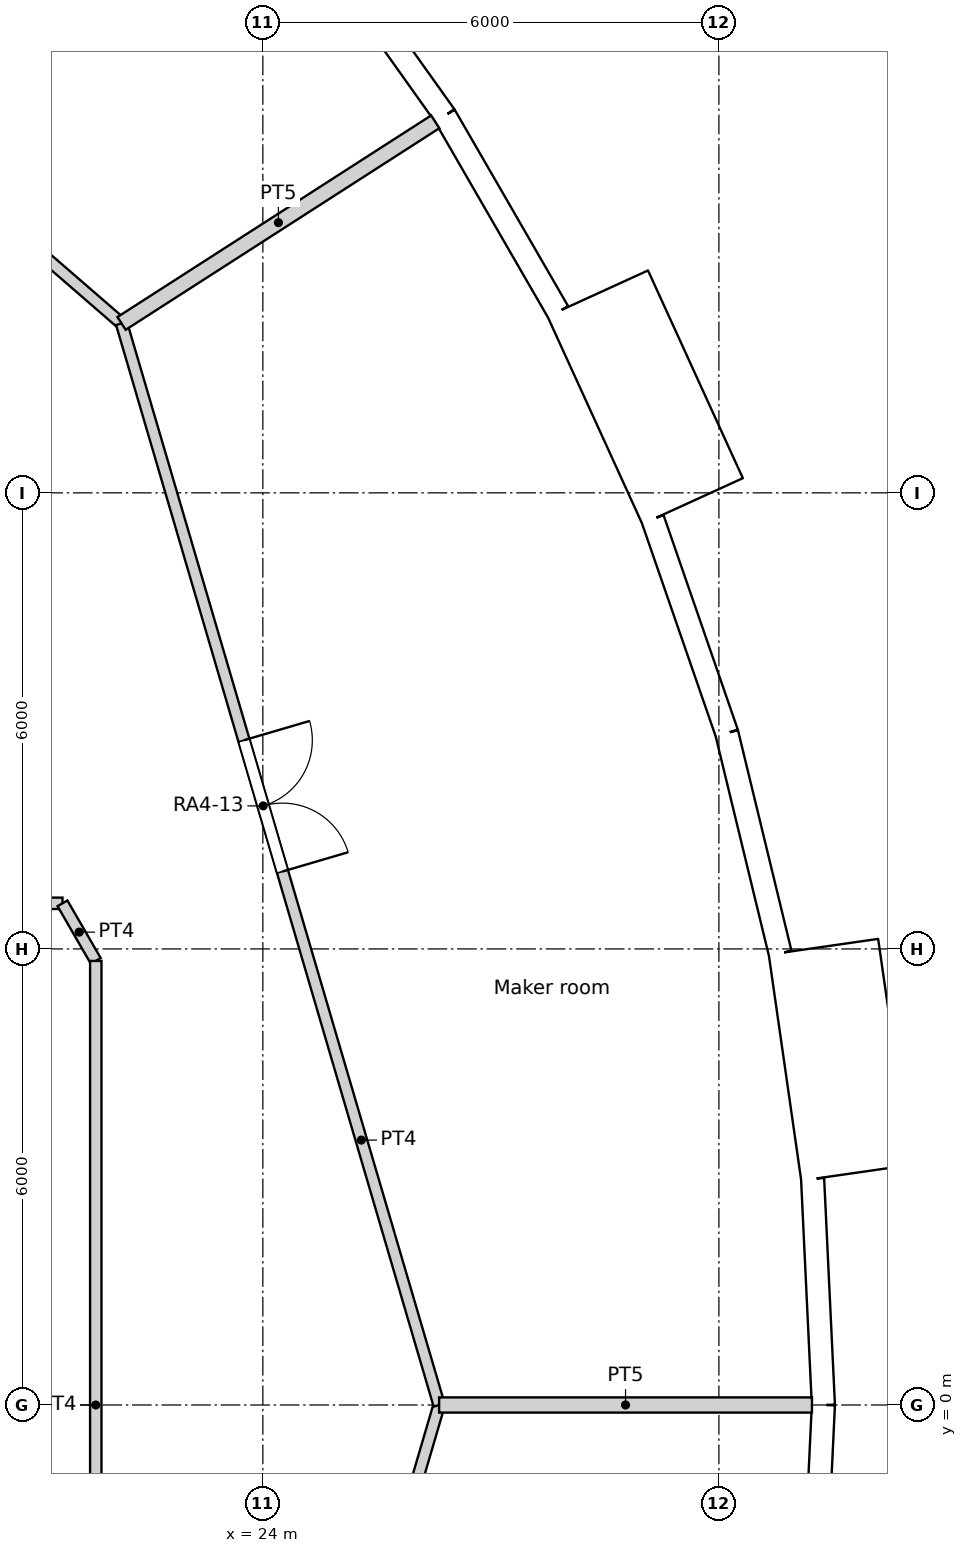
"""IFC4 building model, lengths in metres.
Left out: names, types, materials, properties, quantities, classifications, styles, units other than length and angle.
Written with IfcOpenShell. Run it as: python <this file> out.ifc"""

import sys

from ifc_helpers import new_model, si_unit, direction, frame, frame_2d, origin, origin_2d, place, context, subcontext, project, spatial, rectangle, circle, extrude, element, fill, save


model = new_model("IFC4")
c1 = context("Model", 3, precision=1e-05, world=origin(), true_north=direction((0.0, 1.0)))
c2 = subcontext(c1, "Body", "Model", "MODEL_VIEW")
j1 = project(units=[si_unit("LENGTHUNIT", "METRE"), si_unit("PLANEANGLEUNIT", "RADIAN")], contexts=[c1])
p1 = place(None, origin())
s1 = spatial("IfcSite", under=j1, at=p1, CompositionType="ELEMENT")
p2 = place(p1, origin())
s2 = spatial("IfcBuilding", under=s1, at=p2, CompositionType="ELEMENT")
p3 = place(p2, frame((0.0, 0.0, 60.6)))
s3 = spatial("IfcBuildingStorey", under=s2, at=p3, CompositionType="ELEMENT", Elevation=60.6)
for number, where, z_axis, x_axis in (
    (1, (30.275, 0.0, 0.0), (0.0, 0.0, 1.0), (1.0, 0.0, 0.0)),
    (2, (29.728, 5.729, 0.0), (0.0, 0.0, 1.0), (1.0, 0.0, 0.0)),
    (3, (28.106, 11.252, 0.0), (0.0, 0.0, 1.0), (1.0, 0.0, 0.0)),
    (4, (25.469, 16.368, 0.0), (0.0, 0.0, 1.0), (1.0, 0.0, 0.0)),
):
    element("IfcColumn", number, at=place(p3, frame(where, z_axis=z_axis, x_axis=x_axis)), inside=s3, PredefinedType="COLUMN", context=c2, shape_type="SweptSolid", body=[
        extrude(circle(Radius=0.7, at=origin_2d()), origin(), (0.0, 0.0, 1.0), 3.6),
    ])
for number, where, z_axis, x_axis in (
    (5, (24.548, 0.0, 0.0), (0.0, 0.0, 1.0), (1.0, 0.0, 0.0)),
    (6, (23.886, 5.661, 0.0), (0.0, 0.0, 1.0), (1.0, 0.0, 0.0)),
    (7, (21.937, 11.017, 0.0), (0.0, 0.0, 1.0), (1.0, 0.0, 0.0)),
):
    element("IfcColumn", number, at=place(p3, frame(where, z_axis=z_axis, x_axis=x_axis)), inside=s3, PredefinedType="COLUMN", context=c2, shape_type="SweptSolid", body=[
        extrude(circle(Radius=0.75, at=origin_2d()), origin(), (0.0, 0.0, 1.0), 3.6),
    ])
p4 = place(p3, frame((31.375, 0.0, 0.0), z_axis=(0.0, 0.0, 1.0), x_axis=(-0.047604077644, 0.998866283239, 0.0)))
e8 = element("IfcWall", 8, at=p4, inside=s3, PredefinedType="SOLIDWALL", context=c2, shape_type="SweptSolid", body=[
    extrude(rectangle(XDim=2.98, YDim=0.3, at=frame_2d((1.49, 0.0))), origin(), (0.0, 0.0, 1.0), 3.15),
])
p5 = place(p4, frame((1.49, 0.0, 1.55)))
e9 = element("IfcOpeningElement", 9, at=p5, cuts=e8, PredefinedType="OPENING", context=c2, shape_type="SweptSolid", body=[
    extrude(circle(Radius=0.9, at=origin_2d()), frame((0.0, 0.16, 0.0), z_axis=(0.0, -1.0, 0.0), x_axis=(1.0, 0.0, 0.0)), (0.0, 0.0, 1.0), 0.32),
])
p6 = place(p3, frame((31.802, 3.057, -0.45), z_axis=(0.0, 0.0, 1.0), x_axis=(-0.142332746704, 0.989818866872, 0.0)))
e10 = element("IfcWall", 10, at=p6, inside=s3, PredefinedType="ELEMENTEDWALL", context=c2, shape_type="SweptSolid", body=[
    extrude(rectangle(XDim=3.0, YDim=1.45, at=frame_2d((1.5, 0.0))), origin(), (0.0, 0.0, 1.0), 3.6),
])
p7 = place(p6, frame((1.5, 0.0, 2.0)))
e11 = element("IfcOpeningElement", 11, at=p7, cuts=e10, PredefinedType="OPENING", context=c2, shape_type="SweptSolid", body=[
    extrude(circle(Radius=0.9, at=origin_2d()), frame((0.0, 0.735, 0.0), z_axis=(0.0, -1.0, 0.0), x_axis=(1.0, 0.0, 0.0)), (0.0, 0.0, 1.0), 1.47),
])
p8 = place(p3, frame((30.806, 5.944, 0.0), z_axis=(0.0, 0.0, 1.0), x_axis=(-0.235743081534, 0.971815414319, 0.0)))
e12 = element("IfcWall", 12, at=p8, inside=s3, PredefinedType="SOLIDWALL", context=c2, shape_type="SweptSolid", body=[
    extrude(rectangle(XDim=2.979, YDim=0.3, at=frame_2d((1.49, 0.0))), origin(), (0.0, 0.0, 1.0), 2.65),
])
p9 = place(p8, frame((1.49, 0.0, 1.55)))
e13 = element("IfcOpeningElement", 13, at=p9, cuts=e12, PredefinedType="OPENING", context=c2, shape_type="SweptSolid", body=[
    extrude(circle(Radius=0.9, at=origin_2d()), frame((0.0, 0.16, 0.0), z_axis=(0.0, -1.0, 0.0), x_axis=(1.0, 0.0, 0.0)), (0.0, 0.0, 1.0), 0.32),
])
p10 = place(p3, frame((30.104, 8.839, 0.0), z_axis=(0.0, 0.0, 1.0), x_axis=(-0.327071167136, 0.944999709856, 0.0)))
e14 = element("IfcWall", 14, at=p10, inside=s3, PredefinedType="SOLIDWALL", context=c2, shape_type="SweptSolid", body=[
    extrude(rectangle(XDim=2.98, YDim=0.3, at=frame_2d((1.49, 0.0))), origin(), (0.0, 0.0, 1.0), 3.15),
])
p11 = place(p10, frame((1.49, 0.0, 1.55)))
e15 = element("IfcOpeningElement", 15, at=p11, cuts=e14, PredefinedType="OPENING", context=c2, shape_type="SweptSolid", body=[
    extrude(circle(Radius=0.9, at=origin_2d()), frame((0.0, 0.16, 0.0), z_axis=(0.0, -1.0, 0.0), x_axis=(1.0, 0.0, 0.0)), (0.0, 0.0, 1.0), 0.32),
])
p12 = place(p3, frame((29.653, 11.893, -0.45), z_axis=(0.0, 0.0, 1.0), x_axis=(-0.415427028395, 0.909626508012, 0.0)))
e16 = element("IfcWall", 16, at=p12, inside=s3, PredefinedType="ELEMENTEDWALL", context=c2, shape_type="SweptSolid", body=[
    extrude(rectangle(XDim=3.0, YDim=1.45, at=frame_2d((1.5, 0.0))), origin(), (0.0, 0.0, 1.0), 3.6),
])
p13 = place(p12, frame((1.5, 0.0, 2.0)))
e17 = element("IfcOpeningElement", 17, at=p13, cuts=e16, PredefinedType="OPENING", context=c2, shape_type="SweptSolid", body=[
    extrude(circle(Radius=0.9, at=origin_2d()), frame((0.0, 0.735, 0.0), z_axis=(0.0, -1.0, 0.0), x_axis=(1.0, 0.0, 0.0)), (0.0, 0.0, 1.0), 1.47),
])
p14 = place(p3, frame((27.884, 14.382, 0.0), z_axis=(0.0, 0.0, 1.0), x_axis=(-0.500025049464, 0.866010940986, 0.0)))
e18 = element("IfcWall", 18, at=p14, inside=s3, PredefinedType="SOLIDWALL", context=c2, shape_type="SweptSolid", body=[
    extrude(rectangle(XDim=2.98, YDim=0.3, at=frame_2d((1.49, 0.0))), origin(), (0.0, 0.0, 1.0), 2.65),
])
p15 = place(p14, frame((1.49, 0.0, 1.55)))
e19 = element("IfcOpeningElement", 19, at=p15, cuts=e18, PredefinedType="OPENING", context=c2, shape_type="SweptSolid", body=[
    extrude(circle(Radius=0.9, at=origin_2d()), frame((0.0, 0.16, 0.0), z_axis=(0.0, -1.0, 0.0), x_axis=(1.0, 0.0, 0.0)), (0.0, 0.0, 1.0), 0.32),
])
p16 = place(p3, frame((26.394, 16.962, 0.0), z_axis=(0.0, 0.0, 1.0), x_axis=(-0.580059407678, 0.81457417315, 0.0)))
e20 = element("IfcWall", 20, at=p16, inside=s3, PredefinedType="SOLIDWALL", context=c2, shape_type="SweptSolid", body=[
    extrude(rectangle(XDim=2.979, YDim=0.3, at=frame_2d((1.49, 0.0))), origin(), (0.0, 0.0, 1.0), 3.15),
])
p17 = place(p16, frame((1.49, 0.0, 1.55)))
e21 = element("IfcOpeningElement", 21, at=p17, cuts=e20, PredefinedType="OPENING", context=c2, shape_type="SweptSolid", body=[
    extrude(circle(Radius=0.9, at=origin_2d()), frame((0.0, 0.16, 0.0), z_axis=(0.0, -1.0, 0.0), x_axis=(1.0, 0.0, 0.0)), (0.0, 0.0, 1.0), 0.32),
])
p18 = place(p3, frame((31.233, -2.976, 0.0), z_axis=(0.0, 0.0, 1.0), x_axis=(0.047604077644, 0.998866283239, 0.0)))
e22 = element("IfcWall", 22, at=p18, inside=s3, PredefinedType="SOLIDWALL", context=c2, shape_type="SweptSolid", body=[
    extrude(rectangle(XDim=2.98, YDim=0.3, at=frame_2d((1.49, 0.0))), origin(), (0.0, 0.0, 1.0), 2.65),
])
p19 = place(p18, frame((1.49, 0.0, 1.55)))
e23 = element("IfcOpeningElement", 23, at=p19, cuts=e22, PredefinedType="OPENING", context=c2, shape_type="SweptSolid", body=[
    extrude(circle(Radius=0.9, at=origin_2d()), frame((0.0, 0.16, 0.0), z_axis=(0.0, -1.0, 0.0), x_axis=(1.0, 0.0, 0.0)), (0.0, 0.0, 1.0), 0.32),
])
p20 = place(p3, frame((21.802, -5.842, 0.0), z_axis=(0.0, 0.0, 1.0), x_axis=(0.0, 1.0, 0.0)))
e24 = element("IfcWall", 24, at=p20, inside=s3, PredefinedType="PARTITIONING", context=c2, shape_type="SweptSolid", body=[
    extrude(rectangle(XDim=11.684, YDim=0.15, at=frame_2d((5.842, 0.0))), origin(), (0.0, 0.0, 1.0), 3.15),
])
p21 = place(p3, frame((21.364, 6.6, 0.0), z_axis=(0.0, 0.0, 1.0), x_axis=(0.500277597875, -0.865865073245, 0.0)))
e25 = element("IfcWall", 25, at=p21, inside=s3, PredefinedType="PARTITIONING", context=c2, shape_type="SweptSolid", body=[
    extrude(rectangle(XDim=0.875, YDim=0.15, at=frame_2d((0.438, 0.0))), origin(), (0.0, 0.0, 1.0), 3.15),
])
p22 = place(p3, frame((15.8, 6.6, 0.0), z_axis=(0.0, 0.0, 1.0), x_axis=(1.0, 0.0, 0.0)))
e26 = element("IfcWall", 26, at=p22, inside=s3, PredefinedType="PARTITIONING", context=c2, shape_type="SweptSolid", body=[
    extrude(rectangle(XDim=5.564, YDim=0.15, at=frame_2d((2.782, 0.0))), origin(), (0.0, 0.0, 1.0), 3.15),
])
p23 = place(p3, frame((22.141, 14.229, 0.0), z_axis=(0.0, 0.0, 1.0), x_axis=(0.281730446162, -0.959493593363, 0.0)))
e27 = element("IfcWall", 27, at=p23, inside=s3, PredefinedType="PARTITIONING", context=c2, shape_type="SweptSolid", body=[
    extrude(rectangle(XDim=14.83, YDim=0.15, at=frame_2d((7.415, 0.0))), origin(), (0.0, 0.0, 1.0), 3.15),
])
p24 = place(p23, frame((5.715, 0.0, 0.0)))
e28 = element("IfcOpeningElement", 28, at=p24, cuts=e27, PredefinedType="OPENING", context=c2, shape_type="SweptSolid", body=[
    extrude(rectangle(XDim=1.8, YDim=2.1, at=frame_2d((0.9, 1.05))), frame((0.0, 0.075, 0.0), z_axis=(0.0, -1.0, 0.0), x_axis=(1.0, 0.0, 0.0)), (0.0, 0.0, 1.0), 0.15),
])
p25 = place(p3, frame((10.933, 23.94, 0.0), z_axis=(0.0, 0.0, 1.0), x_axis=(0.755770011705, -0.654837147242, 0.0)))
e29 = element("IfcWall", 29, at=p25, inside=s3, PredefinedType="PARTITIONING", context=c2, shape_type="SweptSolid", body=[
    extrude(rectangle(XDim=14.83, YDim=0.15, at=frame_2d((7.415, 0.0))), origin(), (0.0, 0.0, 1.0), 3.15),
])
p26 = place(p25, frame((6.807, 0.0, 0.0)))
e30 = element("IfcOpeningElement", 30, at=p26, cuts=e29, PredefinedType="OPENING", context=c2, shape_type="SweptSolid", body=[
    extrude(rectangle(XDim=0.95, YDim=2.1, at=frame_2d((0.475, 1.05))), frame((0.0, 0.075, 0.0), z_axis=(0.0, -1.0, 0.0), x_axis=(1.0, 0.0, 0.0)), (0.0, 0.0, 1.0), 0.15),
])
p27 = place(p3, frame((22.141, -14.229, 0.0), z_axis=(0.0, 0.0, 1.0), x_axis=(0.281730446162, 0.959493593363, 0.0)))
e31 = element("IfcWall", 31, at=p27, inside=s3, PredefinedType="PARTITIONING", context=c2, shape_type="SweptSolid", body=[
    extrude(rectangle(XDim=14.83, YDim=0.15, at=frame_2d((7.415, 0.0))), origin(), (0.0, 0.0, 1.0), 3.15),
])
p28 = place(p27, frame((6.54, 0.0, 0.0)))
e32 = element("IfcOpeningElement", 32, at=p28, cuts=e31, PredefinedType="OPENING", context=c2, shape_type="SweptSolid", body=[
    extrude(rectangle(XDim=0.95, YDim=2.1, at=frame_2d((0.475, 1.05))), frame((0.0, 0.075, 0.0), z_axis=(0.0, -1.0, 0.0), x_axis=(1.0, 0.0, 0.0)), (0.0, 0.0, 1.0), 0.15),
])
p29 = place(p3, frame((22.141, 14.229, 0.0), z_axis=(0.0, 0.0, 1.0), x_axis=(0.841265781699, 0.540621757371, 0.0)))
e33 = element("IfcWall", 33, at=p29, inside=s3, PredefinedType="PARTITIONING", context=c2, shape_type="SweptSolid", body=[
    extrude(rectangle(XDim=4.906, YDim=0.2, at=frame_2d((2.453, 0.0))), origin(), (0.0, 0.0, 1.0), 3.15),
])
p30 = place(p3, frame((26.319, 0.0, 0.0), z_axis=(0.0, 0.0, 1.0), x_axis=(1.0, 0.0, 0.0)))
e34 = element("IfcWall", 34, at=p30, inside=s3, PredefinedType="PARTITIONING", context=c2, shape_type="SweptSolid", body=[
    extrude(rectangle(XDim=4.905, YDim=0.2, at=frame_2d((2.453, 0.0))), origin(), (0.0, 0.0, 1.0), 3.15),
])
p31 = place(p5, origin())
e35 = element("IfcWindow", 35, at=p31, inside=s3, PartitioningType="SINGLE_PANEL", PredefinedType="WINDOW", context=c2, shape_type="SweptSolid", body=[
    extrude(circle(Radius=0.9, at=origin_2d()), frame((0.0, 0.12, 0.0), z_axis=(0.0, -1.0, 0.0), x_axis=(1.0, 0.0, 0.0)), (0.0, 0.0, 1.0), 0.1),
])
fill(e9, e35)
p32 = place(p7, origin())
e36 = element("IfcWindow", 36, at=p32, inside=s3, PartitioningType="SINGLE_PANEL", PredefinedType="WINDOW", context=c2, shape_type="SweptSolid", body=[
    extrude(circle(Radius=0.9, at=origin_2d()), frame((0.0, 0.695, 0.0), z_axis=(0.0, -1.0, 0.0), x_axis=(1.0, 0.0, 0.0)), (0.0, 0.0, 1.0), 0.1),
])
fill(e11, e36)
p33 = place(p9, origin())
e37 = element("IfcWindow", 37, at=p33, inside=s3, PartitioningType="SINGLE_PANEL", PredefinedType="WINDOW", context=c2, shape_type="SweptSolid", body=[
    extrude(circle(Radius=0.9, at=origin_2d()), frame((0.0, 0.12, 0.0), z_axis=(0.0, -1.0, 0.0), x_axis=(1.0, 0.0, 0.0)), (0.0, 0.0, 1.0), 0.1),
])
fill(e13, e37)
p34 = place(p11, origin())
e38 = element("IfcWindow", 38, at=p34, inside=s3, PartitioningType="SINGLE_PANEL", PredefinedType="WINDOW", context=c2, shape_type="SweptSolid", body=[
    extrude(circle(Radius=0.9, at=origin_2d()), frame((0.0, 0.12, 0.0), z_axis=(0.0, -1.0, 0.0), x_axis=(1.0, 0.0, 0.0)), (0.0, 0.0, 1.0), 0.1),
])
fill(e15, e38)
p35 = place(p13, origin())
e39 = element("IfcWindow", 39, at=p35, inside=s3, PartitioningType="SINGLE_PANEL", PredefinedType="WINDOW", context=c2, shape_type="SweptSolid", body=[
    extrude(circle(Radius=0.9, at=origin_2d()), frame((0.0, 0.695, 0.0), z_axis=(0.0, -1.0, 0.0), x_axis=(1.0, 0.0, 0.0)), (0.0, 0.0, 1.0), 0.1),
])
fill(e17, e39)
p36 = place(p15, origin())
e40 = element("IfcWindow", 40, at=p36, inside=s3, PartitioningType="SINGLE_PANEL", PredefinedType="WINDOW", context=c2, shape_type="SweptSolid", body=[
    extrude(circle(Radius=0.9, at=origin_2d()), frame((0.0, 0.12, 0.0), z_axis=(0.0, -1.0, 0.0), x_axis=(1.0, 0.0, 0.0)), (0.0, 0.0, 1.0), 0.1),
])
fill(e19, e40)
p37 = place(p17, origin())
e41 = element("IfcWindow", 41, at=p37, inside=s3, PartitioningType="SINGLE_PANEL", PredefinedType="WINDOW", context=c2, shape_type="SweptSolid", body=[
    extrude(circle(Radius=0.9, at=origin_2d()), frame((0.0, 0.12, 0.0), z_axis=(0.0, -1.0, 0.0), x_axis=(1.0, 0.0, 0.0)), (0.0, 0.0, 1.0), 0.1),
])
fill(e21, e41)
p38 = place(p19, origin())
e42 = element("IfcWindow", 42, at=p38, inside=s3, PartitioningType="SINGLE_PANEL", PredefinedType="WINDOW", context=c2, shape_type="SweptSolid", body=[
    extrude(circle(Radius=0.9, at=origin_2d()), frame((0.0, 0.12, 0.0), z_axis=(0.0, -1.0, 0.0), x_axis=(1.0, 0.0, 0.0)), (0.0, 0.0, 1.0), 0.1),
])
fill(e23, e42)
p39 = place(p24, origin())
e43 = element("IfcDoor", 43, at=p39, inside=s3, OperationType="DOUBLE_DOOR_SINGLE_SWING", PredefinedType="DOOR", context=c2, shape_type="SweptSolid", body=[
    extrude(rectangle(XDim=1.8, YDim=2.1, at=frame_2d((0.9, 1.05))), frame((0.0, 0.025, 0.0), z_axis=(0.0, -1.0, 0.0), x_axis=(1.0, 0.0, 0.0)), (0.0, 0.0, 1.0), 0.05),
])
fill(e28, e43)
save(model, sys.argv[1])
